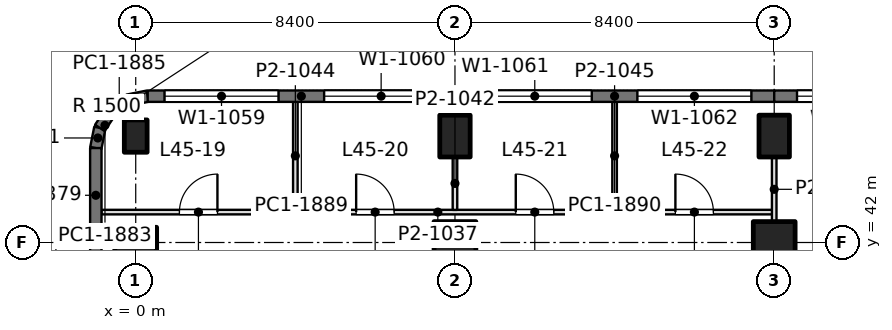
"""IFC4 building model, lengths in metres.
Left out: names, types, materials, properties, quantities, classifications, styles, units other than length and angle.
Written with IfcOpenShell. Run it as: python <this file> out.ifc"""

import sys

from ifc_helpers import new_model, si_unit, direction, frame, frame_2d, origin, origin_2d, place, context, subcontext, project, spatial, rectangle, extrude, element, fill, save


model = new_model("IFC4")
c1 = context("Model", 3, precision=1e-05, world=origin(), true_north=direction((0.0, 1.0)))
c2 = subcontext(c1, "Body", "Model", "MODEL_VIEW")
j1 = project(units=[si_unit("LENGTHUNIT", "METRE"), si_unit("PLANEANGLEUNIT", "RADIAN")], contexts=[c1])
p1 = place(None, origin())
s1 = spatial("IfcSite", under=j1, at=p1, CompositionType="ELEMENT")
p2 = place(p1, origin())
s2 = spatial("IfcBuilding", under=s1, at=p2, CompositionType="ELEMENT")
p3 = place(p2, frame((0.0, 0.0, 198.6)))
s3 = spatial("IfcBuildingStorey", under=s2, at=p3, CompositionType="ELEMENT", Elevation=198.6)
p4 = place(p3, frame((0.0, 42.0, 0.0), z_axis=(0.0, 0.0, 1.0), x_axis=(0.0, 1.0, 0.0)))
e1 = element("IfcColumn", 1, at=p4, inside=s3, PredefinedType="COLUMN", context=c2, shape_type="SweptSolid", body=[
    extrude(rectangle(XDim=0.8, YDim=1.1, at=origin_2d()), origin(), (0.0, 0.0, 1.0), 4.2),
])
p5 = place(p3, frame((0.0, 44.8, 0.0), z_axis=(0.0, 0.0, 1.0), x_axis=(1.0, 0.0, 0.0)))
e2 = element("IfcColumn", 2, at=p5, inside=s3, PredefinedType="COLUMN", context=c2, shape_type="SweptSolid", body=[
    extrude(rectangle(XDim=0.6, YDim=0.85, at=origin_2d()), origin(), (0.0, 0.0, 1.0), 4.2),
])
p6 = place(p3, frame((8.4, 42.0, 0.0), z_axis=(0.0, 0.0, 1.0), x_axis=(1.0, 0.0, 0.0)))
e3 = element("IfcColumn", 3, at=p6, inside=s3, PredefinedType="COLUMN", context=c2, shape_type="SweptSolid", body=[
    extrude(rectangle(XDim=1.1, YDim=1.1, at=origin_2d()), origin(), (0.0, 0.0, 1.0), 4.2),
])
p7 = place(p3, frame((8.4, 44.8, 0.0), z_axis=(0.0, 0.0, 1.0), x_axis=(1.0, 0.0, 0.0)))
e4 = element("IfcColumn", 4, at=p7, inside=s3, PredefinedType="COLUMN", context=c2, shape_type="SweptSolid", body=[
    extrude(rectangle(XDim=0.8, YDim=1.1, at=origin_2d()), origin(), (0.0, 0.0, 1.0), 4.2),
])
p8 = place(p3, frame((16.8, 42.0, 0.0), z_axis=(0.0, 0.0, 1.0), x_axis=(1.0, 0.0, 0.0)))
e5 = element("IfcColumn", 5, at=p8, inside=s3, PredefinedType="COLUMN", context=c2, shape_type="SweptSolid", body=[
    extrude(rectangle(XDim=1.1, YDim=1.1, at=origin_2d()), origin(), (0.0, 0.0, 1.0), 4.2),
])
p9 = place(p3, frame((16.8, 44.8, 0.0), z_axis=(0.0, 0.0, 1.0), x_axis=(1.0, 0.0, 0.0)))
e6 = element("IfcColumn", 6, at=p9, inside=s3, PredefinedType="COLUMN", context=c2, shape_type="SweptSolid", body=[
    extrude(rectangle(XDim=0.8, YDim=1.1, at=origin_2d()), origin(), (0.0, 0.0, 1.0), 4.2),
])
p10 = place(p3, frame((-1.05, 37.725, 0.0), z_axis=(0.0, 0.0, 1.0), x_axis=(0.0, 1.0, 0.0)))
e7 = element("IfcWall", 7, at=p10, inside=s3, PredefinedType="SOLIDWALL", context=c2, shape_type="SweptSolid", body=[
    extrude(rectangle(XDim=4.275, YDim=0.3, at=frame_2d((2.137, 0.0))), origin(), (0.0, 0.0, 1.0), 4.05),
])
p11 = place(p10, frame((0.938, 0.0, 0.9)))
e8 = element("IfcOpeningElement", 8, at=p11, cuts=e7, PredefinedType="OPENING", context=c2, shape_type="SweptSolid", body=[
    extrude(rectangle(XDim=2.4, YDim=1.9, at=frame_2d((1.2, 0.95))), frame((0.0, 0.16, 0.0), z_axis=(0.0, -1.0, 0.0), x_axis=(1.0, 0.0, 0.0)), (0.0, 0.0, 1.0), 0.32),
])
p12 = place(p3, frame((-1.05, 42.0, 0.0), z_axis=(0.0, 0.0, 1.0), x_axis=(0.0, 1.0, 0.0)))
e9 = element("IfcWall", 9, at=p12, inside=s3, PredefinedType="SOLIDWALL", context=c2, shape_type="SweptSolid", body=[
    extrude(rectangle(XDim=2.485, YDim=0.3, at=frame_2d((1.243, 0.0))), origin(), (0.0, 0.0, 1.0), 4.05),
])
p13 = place(p3, frame((-1.05, 44.485, 0.0), z_axis=(0.0, 0.0, 1.0), x_axis=(0.195073962632, 0.980788534345, 0.0)))
e10 = element("IfcWall", 10, at=p13, inside=s3, PredefinedType="SOLIDWALL", context=c2, shape_type="SweptSolid", body=[
    extrude(rectangle(XDim=0.541, YDim=0.3, at=frame_2d((0.271, 0.0))), origin(), (0.0, 0.0, 1.0), 4.05),
])
p14 = place(p3, frame((-0.945, 45.015, 0.0), z_axis=(0.0, 0.0, 1.0), x_axis=(0.55534295404, 0.831621430339, 0.0)))
e11 = element("IfcWall", 11, at=p14, inside=s3, PredefinedType="SOLIDWALL", context=c2, shape_type="SweptSolid", body=[
    extrude(rectangle(XDim=0.526, YDim=0.3, at=frame_2d((0.263, 0.0))), origin(), (0.0, 0.0, 1.0), 4.05),
])
p15 = place(p3, frame((-0.653, 45.453, 0.0), z_axis=(0.0, 0.0, 1.0), x_axis=(0.831692711774, 0.555236195849, 0.0)))
e12 = element("IfcWall", 12, at=p15, inside=s3, PredefinedType="SOLIDWALL", context=c2, shape_type="SweptSolid", body=[
    extrude(rectangle(XDim=0.525, YDim=0.3, at=frame_2d((0.263, 0.0))), origin(), (0.0, 0.0, 1.0), 4.05),
])
p16 = place(p3, frame((-0.216, 45.744, 0.0), z_axis=(0.0, 0.0, 1.0), x_axis=(0.980702050465, 0.1955082817, 0.0)))
e13 = element("IfcWall", 13, at=p16, inside=s3, PredefinedType="SOLIDWALL", context=c2, shape_type="SweptSolid", body=[
    extrude(rectangle(XDim=0.541, YDim=0.3, at=frame_2d((0.271, 0.0))), origin(), (0.0, 0.0, 1.0), 4.05),
])
p17 = place(p3, frame((0.315, 45.85, 0.0), z_axis=(0.0, 0.0, 1.0), x_axis=(1.0, 0.0, 0.0)))
e14 = element("IfcWall", 14, at=p17, inside=s3, PredefinedType="SOLIDWALL", context=c2, shape_type="SweptSolid", body=[
    extrude(rectangle(XDim=8.085, YDim=0.3, at=frame_2d((4.042, 0.0))), origin(), (0.0, 0.0, 1.0), 4.05),
])
p18 = place(p17, frame((0.443, 0.0, 0.9)))
e15 = element("IfcOpeningElement", 15, at=p18, cuts=e14, PredefinedType="OPENING", context=c2, shape_type="SweptSolid", body=[
    extrude(rectangle(XDim=3.0, YDim=1.9, at=frame_2d((1.5, 0.95))), frame((0.0, 0.16, 0.0), z_axis=(0.0, -1.0, 0.0), x_axis=(1.0, 0.0, 0.0)), (0.0, 0.0, 1.0), 0.32),
])
p19 = place(p17, frame((4.643, 0.0, 0.9)))
e16 = element("IfcOpeningElement", 16, at=p19, cuts=e14, PredefinedType="OPENING", context=c2, shape_type="SweptSolid", body=[
    extrude(rectangle(XDim=3.0, YDim=1.9, at=frame_2d((1.5, 0.95))), frame((0.0, 0.16, 0.0), z_axis=(0.0, -1.0, 0.0), x_axis=(1.0, 0.0, 0.0)), (0.0, 0.0, 1.0), 0.32),
])
p20 = place(p3, frame((8.4, 45.85, 0.0), z_axis=(0.0, 0.0, 1.0), x_axis=(1.0, 0.0, 0.0)))
e17 = element("IfcWall", 17, at=p20, inside=s3, PredefinedType="SOLIDWALL", context=c2, shape_type="SweptSolid", body=[
    extrude(rectangle(XDim=8.4, YDim=0.3, at=frame_2d((4.2, 0.0))), origin(), (0.0, 0.0, 1.0), 4.05),
])
p21 = place(p20, frame((0.6, 0.0, 0.9)))
e18 = element("IfcOpeningElement", 18, at=p21, cuts=e17, PredefinedType="OPENING", context=c2, shape_type="SweptSolid", body=[
    extrude(rectangle(XDim=3.0, YDim=1.9, at=frame_2d((1.5, 0.95))), frame((0.0, 0.16, 0.0), z_axis=(0.0, -1.0, 0.0), x_axis=(1.0, 0.0, 0.0)), (0.0, 0.0, 1.0), 0.32),
])
p22 = place(p20, frame((4.8, 0.0, 0.9)))
e19 = element("IfcOpeningElement", 19, at=p22, cuts=e17, PredefinedType="OPENING", context=c2, shape_type="SweptSolid", body=[
    extrude(rectangle(XDim=3.0, YDim=1.9, at=frame_2d((1.5, 0.95))), frame((0.0, 0.16, 0.0), z_axis=(0.0, -1.0, 0.0), x_axis=(1.0, 0.0, 0.0)), (0.0, 0.0, 1.0), 0.32),
])
p23 = place(p3, frame((16.8, 45.85, 0.0), z_axis=(0.0, 0.0, 1.0), x_axis=(1.0, 0.0, 0.0)))
e20 = element("IfcWall", 20, at=p23, inside=s3, PredefinedType="SOLIDWALL", context=c2, shape_type="SweptSolid", body=[
    extrude(rectangle(XDim=8.4, YDim=0.3, at=frame_2d((4.2, 0.0))), origin(), (0.0, 0.0, 1.0), 4.05),
])
p24 = place(p23, frame((0.6, 0.0, 0.9)))
e21 = element("IfcOpeningElement", 21, at=p24, cuts=e20, PredefinedType="OPENING", context=c2, shape_type="SweptSolid", body=[
    extrude(rectangle(XDim=3.0, YDim=1.9, at=frame_2d((1.5, 0.95))), frame((0.0, 0.16, 0.0), z_axis=(0.0, -1.0, 0.0), x_axis=(1.0, 0.0, 0.0)), (0.0, 0.0, 1.0), 0.32),
])
p25 = place(p23, frame((4.8, 0.0, 0.9)))
e22 = element("IfcOpeningElement", 22, at=p25, cuts=e20, PredefinedType="OPENING", context=c2, shape_type="SweptSolid", body=[
    extrude(rectangle(XDim=3.0, YDim=1.9, at=frame_2d((1.5, 0.95))), frame((0.0, 0.16, 0.0), z_axis=(0.0, -1.0, 0.0), x_axis=(1.0, 0.0, 0.0)), (0.0, 0.0, 1.0), 0.32),
])
p26 = place(p3, frame((-0.902, 42.8, 0.0), z_axis=(0.0, 0.0, 1.0), x_axis=(1.0, 0.0, 0.0)))
e23 = element("IfcWall", 23, at=p26, inside=s3, PredefinedType="PARTITIONING", context=c2, shape_type="SweptSolid", body=[
    extrude(rectangle(XDim=17.702, YDim=0.12, at=frame_2d((8.851, 0.0))), origin(), (0.0, 0.0, 1.0), 3.56),
])
p27 = place(p26, frame((2.052, 0.0, 0.0)))
e24 = element("IfcOpeningElement", 24, at=p27, cuts=e23, PredefinedType="OPENING", context=c2, shape_type="SweptSolid", body=[
    extrude(rectangle(XDim=1.0, YDim=2.4, at=frame_2d((0.5, 1.2))), frame((0.0, 0.07, 0.0), z_axis=(0.0, -1.0, 0.0), x_axis=(1.0, 0.0, 0.0)), (0.0, 0.0, 1.0), 0.14),
])
p28 = place(p26, frame((6.702, 0.0, 0.0)))
e25 = element("IfcOpeningElement", 25, at=p28, cuts=e23, PredefinedType="OPENING", context=c2, shape_type="SweptSolid", body=[
    extrude(rectangle(XDim=1.0, YDim=2.4, at=frame_2d((0.5, 1.2))), frame((0.0, 0.07, 0.0), z_axis=(0.0, -1.0, 0.0), x_axis=(1.0, 0.0, 0.0)), (0.0, 0.0, 1.0), 0.14),
])
p29 = place(p26, frame((10.902, 0.0, 0.0)))
e26 = element("IfcOpeningElement", 26, at=p29, cuts=e23, PredefinedType="OPENING", context=c2, shape_type="SweptSolid", body=[
    extrude(rectangle(XDim=1.0, YDim=2.4, at=frame_2d((0.5, 1.2))), frame((0.0, 0.07, 0.0), z_axis=(0.0, -1.0, 0.0), x_axis=(1.0, 0.0, 0.0)), (0.0, 0.0, 1.0), 0.14),
])
p30 = place(p26, frame((15.102, 0.0, 0.0)))
e27 = element("IfcOpeningElement", 27, at=p30, cuts=e23, PredefinedType="OPENING", context=c2, shape_type="SweptSolid", body=[
    extrude(rectangle(XDim=1.0, YDim=2.4, at=frame_2d((0.5, 1.2))), frame((0.0, 0.07, 0.0), z_axis=(0.0, -1.0, 0.0), x_axis=(1.0, 0.0, 0.0)), (0.0, 0.0, 1.0), 0.14),
])
p31 = place(p3, frame((4.2, 42.858, 0.0), z_axis=(0.0, 0.0, 1.0), x_axis=(0.0, 1.0, 0.0)))
e28 = element("IfcWall", 28, at=p31, inside=s3, PredefinedType="PARTITIONING", context=c2, shape_type="SweptSolid", body=[
    extrude(rectangle(XDim=2.844, YDim=0.12, at=frame_2d((1.422, 0.0))), origin(), (0.0, 0.0, 1.0), 3.56),
])
p32 = place(p3, frame((8.4, 42.858, 0.0), z_axis=(0.0, 0.0, 1.0), x_axis=(0.0, 1.0, 0.0)))
e29 = element("IfcWall", 29, at=p32, inside=s3, PredefinedType="PARTITIONING", context=c2, shape_type="SweptSolid", body=[
    extrude(rectangle(XDim=1.393, YDim=0.12, at=frame_2d((0.697, 0.0))), origin(), (0.0, 0.0, 1.0), 3.69),
])
p33 = place(p3, frame((12.6, 42.858, 0.0), z_axis=(0.0, 0.0, 1.0), x_axis=(0.0, 1.0, 0.0)))
e30 = element("IfcWall", 30, at=p33, inside=s3, PredefinedType="PARTITIONING", context=c2, shape_type="SweptSolid", body=[
    extrude(rectangle(XDim=2.844, YDim=0.12, at=frame_2d((1.422, 0.0))), origin(), (0.0, 0.0, 1.0), 3.56),
])
p34 = place(p3, frame((16.8, 42.548, 0.0), z_axis=(0.0, 0.0, 1.0), x_axis=(0.0, 1.0, 0.0)))
e31 = element("IfcWall", 31, at=p34, inside=s3, PredefinedType="PARTITIONING", context=c2, shape_type="SweptSolid", body=[
    extrude(rectangle(XDim=1.703, YDim=0.12, at=frame_2d((0.852, 0.0))), origin(), (0.0, 0.0, 1.0), 3.69),
])
p35 = place(p18, origin())
e32 = element("IfcWindow", 32, at=p35, inside=s3, PartitioningType="SINGLE_PANEL", PredefinedType="WINDOW", context=c2, shape_type="SweptSolid", body=[
    extrude(rectangle(XDim=3.0, YDim=1.9, at=frame_2d((1.5, 0.95))), frame((0.0, 0.03, 0.0), z_axis=(0.0, -1.0, 0.0), x_axis=(1.0, 0.0, 0.0)), (0.0, 0.0, 1.0), 0.06),
])
fill(e15, e32)
p36 = place(p19, origin())
e33 = element("IfcWindow", 33, at=p36, inside=s3, PartitioningType="SINGLE_PANEL", PredefinedType="WINDOW", context=c2, shape_type="SweptSolid", body=[
    extrude(rectangle(XDim=3.0, YDim=1.9, at=frame_2d((1.5, 0.95))), frame((0.0, 0.03, 0.0), z_axis=(0.0, -1.0, 0.0), x_axis=(1.0, 0.0, 0.0)), (0.0, 0.0, 1.0), 0.06),
])
fill(e16, e33)
p37 = place(p21, origin())
e34 = element("IfcWindow", 34, at=p37, inside=s3, PartitioningType="SINGLE_PANEL", PredefinedType="WINDOW", context=c2, shape_type="SweptSolid", body=[
    extrude(rectangle(XDim=3.0, YDim=1.9, at=frame_2d((1.5, 0.95))), frame((0.0, 0.03, 0.0), z_axis=(0.0, -1.0, 0.0), x_axis=(1.0, 0.0, 0.0)), (0.0, 0.0, 1.0), 0.06),
])
fill(e18, e34)
p38 = place(p22, origin())
e35 = element("IfcWindow", 35, at=p38, inside=s3, PartitioningType="SINGLE_PANEL", PredefinedType="WINDOW", context=c2, shape_type="SweptSolid", body=[
    extrude(rectangle(XDim=3.0, YDim=1.9, at=frame_2d((1.5, 0.95))), frame((0.0, 0.03, 0.0), z_axis=(0.0, -1.0, 0.0), x_axis=(1.0, 0.0, 0.0)), (0.0, 0.0, 1.0), 0.06),
])
fill(e19, e35)
p39 = place(p24, origin())
e36 = element("IfcWindow", 36, at=p39, inside=s3, PartitioningType="SINGLE_PANEL", PredefinedType="WINDOW", context=c2, shape_type="SweptSolid", body=[
    extrude(rectangle(XDim=3.0, YDim=1.9, at=frame_2d((1.5, 0.95))), frame((0.0, 0.03, 0.0), z_axis=(0.0, -1.0, 0.0), x_axis=(1.0, 0.0, 0.0)), (0.0, 0.0, 1.0), 0.06),
])
fill(e21, e36)
p40 = place(p27, origin())
e37 = element("IfcDoor", 37, at=p40, inside=s3, OperationType="SINGLE_SWING_RIGHT", PredefinedType="DOOR", context=c2, shape_type="SweptSolid", body=[
    extrude(rectangle(XDim=1.0, YDim=2.4, at=frame_2d((0.5, 1.2))), frame((0.0, 0.025, 0.0), z_axis=(0.0, -1.0, 0.0), x_axis=(1.0, 0.0, 0.0)), (0.0, 0.0, 1.0), 0.05),
])
fill(e24, e37)
p41 = place(p28, origin())
e38 = element("IfcDoor", 38, at=p41, inside=s3, OperationType="SINGLE_SWING_LEFT", PredefinedType="DOOR", context=c2, shape_type="SweptSolid", body=[
    extrude(rectangle(XDim=1.0, YDim=2.4, at=frame_2d((0.5, 1.2))), frame((0.0, 0.025, 0.0), z_axis=(0.0, -1.0, 0.0), x_axis=(1.0, 0.0, 0.0)), (0.0, 0.0, 1.0), 0.05),
])
fill(e25, e38)
p42 = place(p29, origin())
e39 = element("IfcDoor", 39, at=p42, inside=s3, OperationType="SINGLE_SWING_LEFT", PredefinedType="DOOR", context=c2, shape_type="SweptSolid", body=[
    extrude(rectangle(XDim=1.0, YDim=2.4, at=frame_2d((0.5, 1.2))), frame((0.0, 0.025, 0.0), z_axis=(0.0, -1.0, 0.0), x_axis=(1.0, 0.0, 0.0)), (0.0, 0.0, 1.0), 0.05),
])
fill(e26, e39)
p43 = place(p30, origin())
e40 = element("IfcDoor", 40, at=p43, inside=s3, OperationType="SINGLE_SWING_LEFT", PredefinedType="DOOR", context=c2, shape_type="SweptSolid", body=[
    extrude(rectangle(XDim=1.0, YDim=2.4, at=frame_2d((0.5, 1.2))), frame((0.0, 0.025, 0.0), z_axis=(0.0, -1.0, 0.0), x_axis=(1.0, 0.0, 0.0)), (0.0, 0.0, 1.0), 0.05),
])
fill(e27, e40)
save(model, sys.argv[1])
